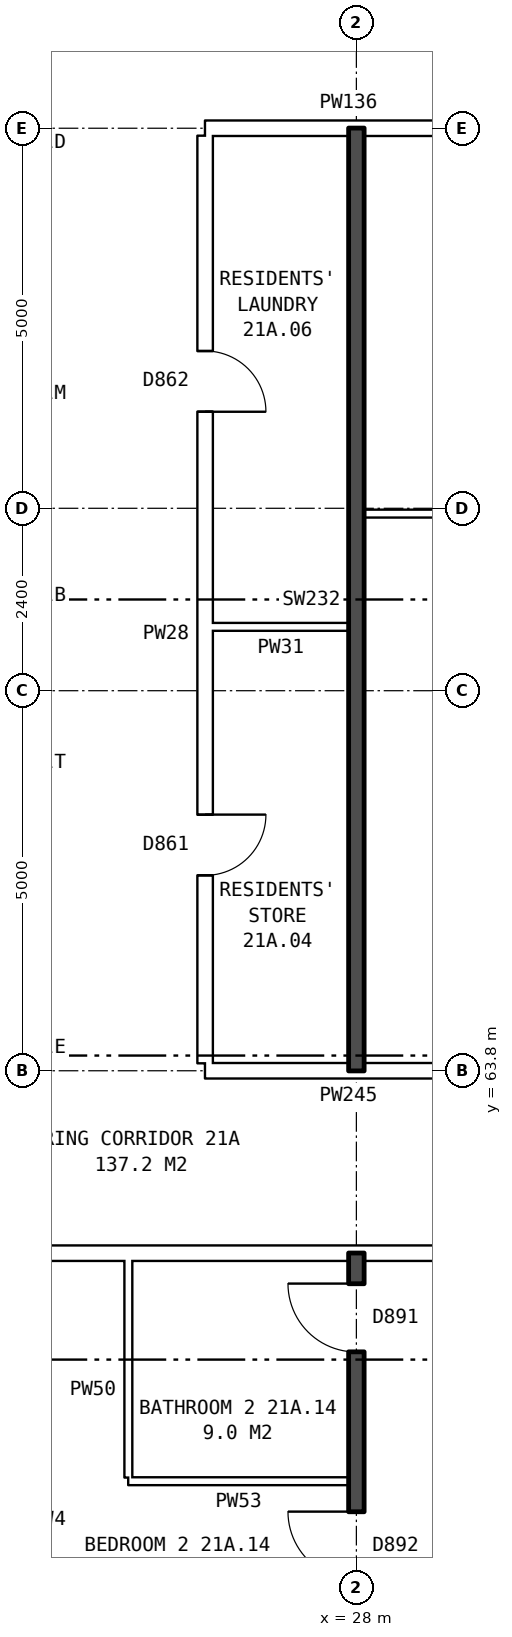
"""IFC4 building model, lengths in metres.
Left out: names, types, materials, properties, quantities, classifications, styles, units other than length and angle.
Written with IfcOpenShell. Run it as: python <this file> out.ifc"""

import sys

from ifc_helpers import new_model, si_unit, direction, frame, frame_2d, origin, place, context, subcontext, project, spatial, rectangle, extrude, element, fill, save


model = new_model("IFC4")
c1 = context("Model", 3, precision=1e-05, world=origin(), true_north=direction((0.0, 1.0)))
c2 = subcontext(c1, "Body", "Model", "MODEL_VIEW")
j1 = project(units=[si_unit("LENGTHUNIT", "METRE"), si_unit("PLANEANGLEUNIT", "RADIAN")], contexts=[c1])
p1 = place(None, origin())
s1 = spatial("IfcSite", under=j1, at=p1, CompositionType="ELEMENT")
p2 = place(p1, origin())
s2 = spatial("IfcBuilding", under=s1, at=p2, CompositionType="ELEMENT")
p3 = place(p2, frame((0.0, 0.0, 77.8)))
s3 = spatial("IfcBuildingStorey", under=s2, at=p3, CompositionType="ELEMENT", Elevation=77.8)
p4 = place(p3, frame((25.0, 58.4, 0.0), z_axis=(0.0, 0.0, 1.0), x_axis=(1.0, 0.0, 0.0)))
e1 = element("IfcWall", 1, at=p4, inside=s3, PredefinedType="PARTITIONING", context=c2, shape_type="SweptSolid", body=[
    extrude(rectangle(XDim=2.9, YDim=0.1, at=frame_2d((1.45, 0.0))), origin(), (0.0, 0.0, 1.0), 2.85),
])
p5 = place(p3, frame((23.61, 61.4, 0.0), z_axis=(0.0, 0.0, 1.0), x_axis=(1.0, 0.0, 0.0)))
e2 = element("IfcWall", 2, at=p5, inside=s3, PredefinedType="PARTITIONING", context=c2, shape_type="SweptSolid", body=[
    extrude(rectangle(XDim=22.29, YDim=0.2, at=frame_2d((11.145, 0.0))), origin(), (0.0, 0.0, 1.0), 2.85),
])
p6 = place(p5, frame((18.84, 0.0, 0.0)))
e3 = element("IfcOpeningElement", 3, at=p6, cuts=e2, PredefinedType="OPENING", context=c2, shape_type="SweptSolid", body=[
    extrude(rectangle(XDim=1.0, YDim=2.1, at=frame_2d((0.5, 1.05))), frame((0.0, 0.11, 0.0), z_axis=(0.0, -1.0, 0.0), x_axis=(1.0, 0.0, 0.0)), (0.0, 0.0, 1.0), 0.22),
])
p7 = place(p5, frame((6.89, 0.0, 0.0)))
e4 = element("IfcOpeningElement", 4, at=p7, cuts=e2, PredefinedType="OPENING", context=c2, shape_type="SweptSolid", body=[
    extrude(rectangle(XDim=1.0, YDim=2.1, at=frame_2d((0.5, 1.05))), frame((0.0, 0.11, 0.0), z_axis=(0.0, -1.0, 0.0), x_axis=(1.0, 0.0, 0.0)), (0.0, 0.0, 1.0), 0.22),
])
p8 = place(p3, frame((26.01, 63.8, 0.0), z_axis=(0.0, 0.0, 1.0), x_axis=(1.0, 0.0, 0.0)))
e5 = element("IfcWall", 5, at=p8, inside=s3, PredefinedType="PARTITIONING", context=c2, shape_type="SweptSolid", body=[
    extrude(rectangle(XDim=6.35, YDim=0.2, at=frame_2d((3.175, 0.0))), origin(), (0.0, 0.0, 1.0), 2.85),
])
p9 = place(p8, frame((3.77, 0.0, 0.0)))
e6 = element("IfcOpeningElement", 6, at=p9, cuts=e5, PredefinedType="OPENING", context=c2, shape_type="SweptSolid", body=[
    extrude(rectangle(XDim=0.8, YDim=2.1, at=frame_2d((0.4, 1.05))), frame((0.0, 0.11, 0.0), z_axis=(0.0, -1.0, 0.0), x_axis=(1.0, 0.0, 0.0)), (0.0, 0.0, 1.0), 0.22),
])
p10 = place(p3, frame((26.11, 69.64, 0.0), z_axis=(0.0, 0.0, 1.0), x_axis=(1.0, 0.0, 0.0)))
e7 = element("IfcWall", 7, at=p10, inside=s3, PredefinedType="PARTITIONING", context=c2, shape_type="SweptSolid", body=[
    extrude(rectangle(XDim=1.79, YDim=0.1, at=frame_2d((0.895, 0.0))), origin(), (0.0, 0.0, 1.0), 2.85),
])
p11 = place(p3, frame((28.1, 71.13, 0.0), z_axis=(0.0, 0.0, 1.0), x_axis=(1.0, 0.0, 0.0)))
e8 = element("IfcWall", 8, at=p11, inside=s3, PredefinedType="PARTITIONING", context=c2, shape_type="SweptSolid", body=[
    extrude(rectangle(XDim=4.26, YDim=0.1, at=frame_2d((2.13, 0.0))), origin(), (0.0, 0.0, 1.0), 2.85),
])
p12 = place(p3, frame((26.01, 76.2, 0.0), z_axis=(0.0, 0.0, 1.0), x_axis=(1.0, 0.0, 0.0)))
e9 = element("IfcWall", 9, at=p12, inside=s3, PredefinedType="PARTITIONING", context=c2, shape_type="SweptSolid", body=[
    extrude(rectangle(XDim=6.35, YDim=0.2, at=frame_2d((3.175, 0.0))), origin(), (0.0, 0.0, 1.0), 2.85),
])
p13 = place(p12, frame((3.77, 0.0, 0.0)))
e10 = element("IfcOpeningElement", 10, at=p13, cuts=e9, PredefinedType="OPENING", context=c2, shape_type="SweptSolid", body=[
    extrude(rectangle(XDim=0.8, YDim=2.1, at=frame_2d((0.4, 1.05))), frame((0.0, 0.11, 0.0), z_axis=(0.0, -1.0, 0.0), x_axis=(1.0, 0.0, 0.0)), (0.0, 0.0, 1.0), 0.22),
])
p14 = place(p3, frame((25.0, 58.45, 0.0), z_axis=(0.0, 0.0, 1.0), x_axis=(0.0, 1.0, 0.0)))
e11 = element("IfcWall", 11, at=p14, inside=s3, PredefinedType="PARTITIONING", context=c2, shape_type="SweptSolid", body=[
    extrude(rectangle(XDim=2.85, YDim=0.1, at=frame_2d((1.425, 0.0))), origin(), (0.0, 0.0, 1.0), 2.85),
])
p15 = place(p3, frame((26.01, 63.9, 0.0), z_axis=(0.0, 0.0, 1.0), x_axis=(0.0, 1.0, 0.0)))
e12 = element("IfcWall", 12, at=p15, inside=s3, PredefinedType="PARTITIONING", context=c2, shape_type="SweptSolid", body=[
    extrude(rectangle(XDim=12.2, YDim=0.2, at=frame_2d((6.1, 0.0))), origin(), (0.0, 0.0, 1.0), 2.85),
])
p16 = place(p15, frame((2.47, 0.0, 0.0)))
e13 = element("IfcOpeningElement", 13, at=p16, cuts=e12, PredefinedType="OPENING", context=c2, shape_type="SweptSolid", body=[
    extrude(rectangle(XDim=0.8, YDim=2.1, at=frame_2d((0.4, 1.05))), frame((0.0, 0.11, 0.0), z_axis=(0.0, -1.0, 0.0), x_axis=(1.0, 0.0, 0.0)), (0.0, 0.0, 1.0), 0.22),
])
p17 = place(p15, frame((8.57, 0.0, 0.0)))
e14 = element("IfcOpeningElement", 14, at=p17, cuts=e12, PredefinedType="OPENING", context=c2, shape_type="SweptSolid", body=[
    extrude(rectangle(XDim=0.8, YDim=2.1, at=frame_2d((0.4, 1.05))), frame((0.0, 0.11, 0.0), z_axis=(0.0, -1.0, 0.0), x_axis=(1.0, 0.0, 0.0)), (0.0, 0.0, 1.0), 0.22),
])
p18 = place(p3, frame((28.0, 54.36, 0.0), z_axis=(0.0, 0.0, 1.0), x_axis=(0.0, 1.0, 0.0)))
e15 = element("IfcWall", 15, at=p18, inside=s3, PredefinedType="SOLIDWALL", context=c2, shape_type="SweptSolid", body=[
    extrude(rectangle(XDim=7.04, YDim=0.2, at=frame_2d((3.52, 0.0))), origin(), (0.0, 0.0, 1.0), 2.85),
])
p19 = place(p18, frame((2.74, 0.0, 0.0)))
e16 = element("IfcOpeningElement", 16, at=p19, cuts=e15, PredefinedType="OPENING", context=c2, shape_type="SweptSolid", body=[
    extrude(rectangle(XDim=0.9, YDim=2.1, at=frame_2d((0.45, 1.05))), frame((0.0, 0.11, 0.0), z_axis=(0.0, -1.0, 0.0), x_axis=(1.0, 0.0, 0.0)), (0.0, 0.0, 1.0), 0.22),
])
p20 = place(p18, frame((5.74, 0.0, 0.0)))
e17 = element("IfcOpeningElement", 17, at=p20, cuts=e15, PredefinedType="OPENING", context=c2, shape_type="SweptSolid", body=[
    extrude(rectangle(XDim=0.9, YDim=2.1, at=frame_2d((0.45, 1.05))), frame((0.0, 0.11, 0.0), z_axis=(0.0, -1.0, 0.0), x_axis=(1.0, 0.0, 0.0)), (0.0, 0.0, 1.0), 0.22),
])
p21 = place(p3, frame((28.0, 63.8, 0.0), z_axis=(0.0, 0.0, 1.0), x_axis=(0.0, 1.0, 0.0)))
e18 = element("IfcWall", 18, at=p21, inside=s3, PredefinedType="SOLIDWALL", context=c2, shape_type="SweptSolid", body=[
    extrude(rectangle(XDim=12.4, YDim=0.2, at=frame_2d((6.2, 0.0))), origin(), (0.0, 0.0, 1.0), 2.85),
])
p22 = place(p16, frame((0.8, 0.0, 0.0), z_axis=(0.0, 0.0, 1.0), x_axis=(-1.0, 0.0, 0.0)))
e19 = element("IfcDoor", 19, at=p22, inside=s3, OperationType="SINGLE_SWING_LEFT", PredefinedType="DOOR", context=c2, shape_type="SweptSolid", body=[
    extrude(rectangle(XDim=0.8, YDim=2.1, at=frame_2d((0.4, 1.05))), frame((0.0, 0.025, 0.0), z_axis=(0.0, -1.0, 0.0), x_axis=(1.0, 0.0, 0.0)), (0.0, 0.0, 1.0), 0.05),
])
fill(e13, e19)
p23 = place(p17, frame((0.8, 0.0, 0.0), z_axis=(0.0, 0.0, 1.0), x_axis=(-1.0, 0.0, 0.0)))
e20 = element("IfcDoor", 20, at=p23, inside=s3, OperationType="SINGLE_SWING_RIGHT", PredefinedType="DOOR", context=c2, shape_type="SweptSolid", body=[
    extrude(rectangle(XDim=0.8, YDim=2.1, at=frame_2d((0.4, 1.05))), frame((0.0, 0.025, 0.0), z_axis=(0.0, -1.0, 0.0), x_axis=(1.0, 0.0, 0.0)), (0.0, 0.0, 1.0), 0.05),
])
fill(e14, e20)
p24 = place(p19, origin())
e21 = element("IfcDoor", 21, at=p24, inside=s3, OperationType="SINGLE_SWING_RIGHT", PredefinedType="DOOR", context=c2, shape_type="SweptSolid", body=[
    extrude(rectangle(XDim=0.9, YDim=2.1, at=frame_2d((0.45, 1.05))), frame((0.0, 0.025, 0.0), z_axis=(0.0, -1.0, 0.0), x_axis=(1.0, 0.0, 0.0)), (0.0, 0.0, 1.0), 0.05),
])
fill(e16, e21)
p25 = place(p20, origin())
e22 = element("IfcDoor", 22, at=p25, inside=s3, OperationType="SINGLE_SWING_RIGHT", PredefinedType="DOOR", context=c2, shape_type="SweptSolid", body=[
    extrude(rectangle(XDim=0.9, YDim=2.1, at=frame_2d((0.45, 1.05))), frame((0.0, 0.025, 0.0), z_axis=(0.0, -1.0, 0.0), x_axis=(1.0, 0.0, 0.0)), (0.0, 0.0, 1.0), 0.05),
])
fill(e17, e22)
save(model, sys.argv[1])
